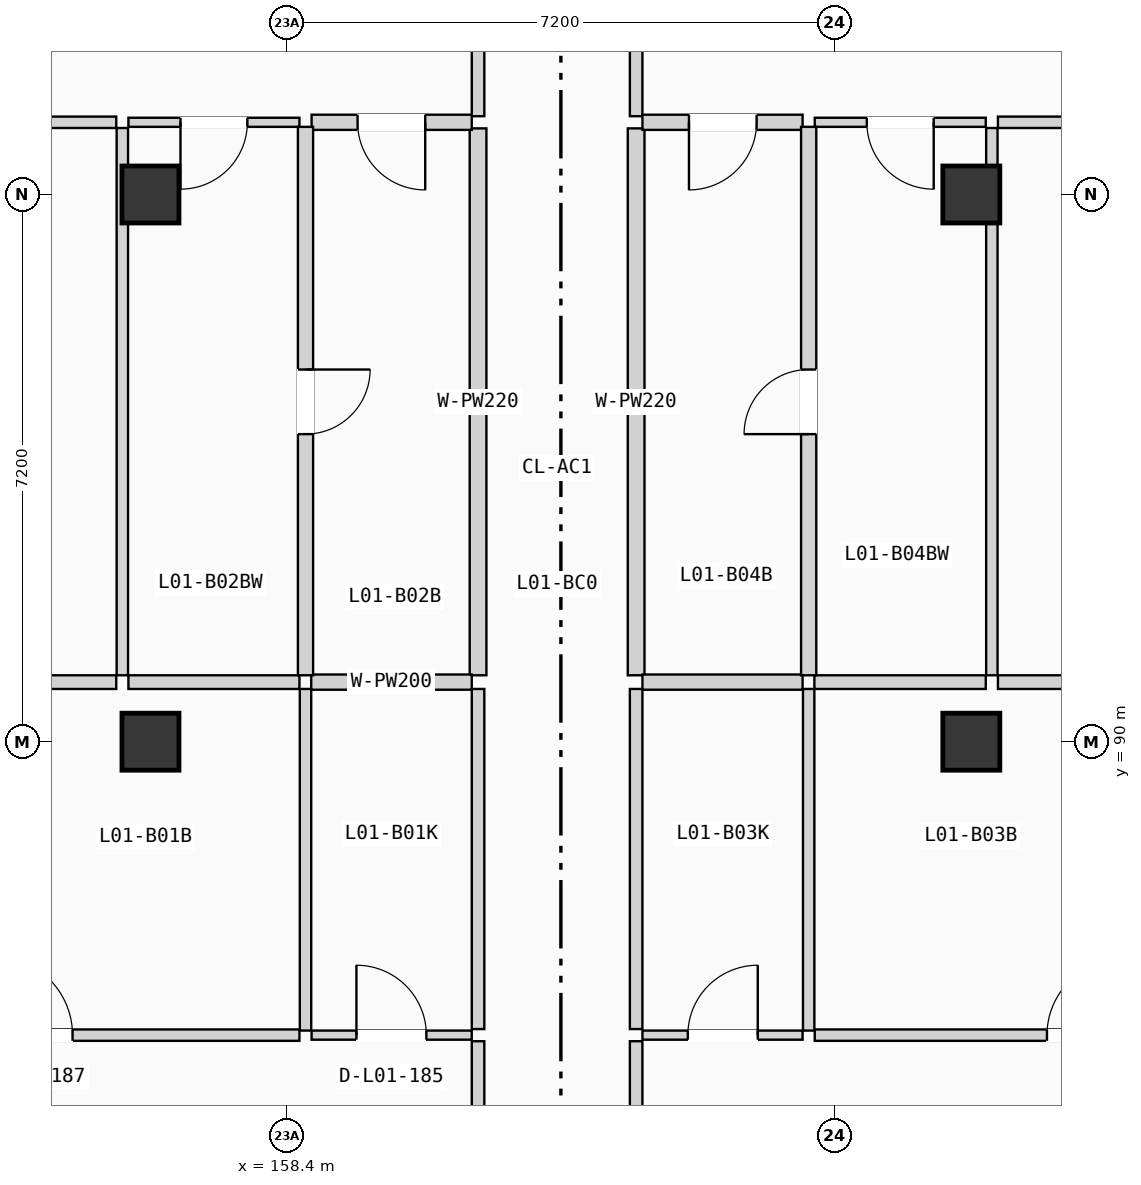
"""IFC4 building model, lengths in metres.
Left out: names, types, materials, properties, quantities, classifications, styles, units other than length and angle.
Written with IfcOpenShell. Run it as: python <this file> out.ifc"""

import sys

from ifc_helpers import new_model, si_unit, direction, frame, frame_2d, origin, origin_2d, place, context, subcontext, project, spatial, rectangle, extrude, element, fill, save


model = new_model("IFC4")
c1 = context("Model", 3, precision=1e-05, world=origin(), true_north=direction((0.0, 1.0)))
c2 = subcontext(c1, "Body", "Model", "MODEL_VIEW")
j1 = project(units=[si_unit("LENGTHUNIT", "METRE"), si_unit("PLANEANGLEUNIT", "RADIAN")], contexts=[c1])
p1 = place(None, origin())
s1 = spatial("IfcSite", under=j1, at=p1, CompositionType="ELEMENT")
p2 = place(p1, origin())
s2 = spatial("IfcBuilding", under=s1, at=p2, CompositionType="ELEMENT")
p3 = place(p2, frame((0.0, 0.0, 4.9)))
s3 = spatial("IfcBuildingStorey", under=s2, at=p3, CompositionType="ELEMENT", Elevation=4.9)
for number, where, z_axis, x_axis in (
    (1, (156.6, 90.0, 0.0), (0.0, 0.0, 1.0), (1.0, 0.0, 0.0)),
    (2, (156.6, 97.2, 0.0), (0.0, 0.0, 1.0), (1.0, 0.0, 0.0)),
    (3, (167.4, 90.0, 0.0), (0.0, 0.0, 1.0), (1.0, 0.0, 0.0)),
    (4, (167.4, 97.2, 0.0), (0.0, 0.0, 1.0), (1.0, 0.0, 0.0)),
):
    element("IfcColumn", number, at=place(p3, frame(where, z_axis=z_axis, x_axis=x_axis)), inside=s3, PredefinedType="COLUMN", context=c2, shape_type="SweptSolid", body=[
        extrude(rectangle(XDim=0.75, YDim=0.75, at=origin_2d()), origin(), (0.0, 0.0, 1.0), 3.675),
    ])
p4 = place(p3, frame((160.91, 80.635, 0.0), z_axis=(0.0, 0.0, 1.0), x_axis=(0.0, 1.0, 0.0)))
e5 = element("IfcWall", 5, at=p4, inside=s3, PredefinedType="PARTITIONING", context=c2, shape_type="SweptSolid", body=[
    extrude(rectangle(XDim=5.424, YDim=0.165, at=frame_2d((2.712, 0.0))), origin(), (0.0, 0.0, 1.0), 3.395),
])
p5 = place(p4, frame((2.207, 0.0, 0.0)))
e6 = element("IfcOpeningElement", 6, at=p5, cuts=e5, PredefinedType="OPENING", context=c2, shape_type="SweptSolid", body=[
    extrude(rectangle(XDim=1.01, YDim=2.11, at=frame_2d((0.505, 1.055))), frame((0.0, 0.093, 0.0), z_axis=(0.0, -1.0, 0.0), x_axis=(1.0, 0.0, 0.0)), (0.0, 0.0, 1.0), 0.185),
])
p6 = place(p3, frame((160.91, 86.219, 0.0), z_axis=(0.0, 0.0, 1.0), x_axis=(0.0, 1.0, 0.0)))
e7 = element("IfcWall", 7, at=p6, inside=s3, PredefinedType="PARTITIONING", context=c2, shape_type="SweptSolid", body=[
    extrude(rectangle(XDim=4.475, YDim=0.165, at=frame_2d((2.238, 0.0))), origin(), (0.0, 0.0, 1.0), 3.395),
])
p7 = place(p3, frame((160.91, 98.23, 0.0), z_axis=(0.0, 0.0, 1.0), x_axis=(0.0, 1.0, 0.0)))
e8 = element("IfcWall", 8, at=p7, inside=s3, PredefinedType="PARTITIONING", context=c2, shape_type="SweptSolid", body=[
    extrude(rectangle(XDim=5.14, YDim=0.165, at=frame_2d((2.57, 0.0))), origin(), (0.0, 0.0, 1.0), 3.395),
])
p8 = place(p7, frame((2.065, 0.0, 0.0)))
e9 = element("IfcOpeningElement", 9, at=p8, cuts=e8, PredefinedType="OPENING", context=c2, shape_type="SweptSolid", body=[
    extrude(rectangle(XDim=1.01, YDim=2.11, at=frame_2d((0.505, 1.055))), frame((0.0, 0.093, 0.0), z_axis=(0.0, -1.0, 0.0), x_axis=(1.0, 0.0, 0.0)), (0.0, 0.0, 1.0), 0.185),
])
p9 = place(p3, frame((160.91, 90.874, 0.0), z_axis=(0.0, 0.0, 1.0), x_axis=(0.0, 1.0, 0.0)))
e10 = element("IfcWall", 10, at=p9, inside=s3, PredefinedType="PLUMBINGWALL", context=c2, shape_type="SweptSolid", body=[
    extrude(rectangle(XDim=7.196, YDim=0.22, at=frame_2d((3.598, 0.0))), origin(), (0.0, 0.0, 1.0), 3.395),
])
p10 = place(p3, frame((162.99, 80.635, 0.0), z_axis=(0.0, 0.0, 1.0), x_axis=(0.0, 1.0, 0.0)))
e11 = element("IfcWall", 11, at=p10, inside=s3, PredefinedType="PARTITIONING", context=c2, shape_type="SweptSolid", body=[
    extrude(rectangle(XDim=5.424, YDim=0.165, at=frame_2d((2.712, 0.0))), origin(), (0.0, 0.0, 1.0), 3.395),
])
p11 = place(p10, frame((2.207, 0.0, 0.0)))
e12 = element("IfcOpeningElement", 12, at=p11, cuts=e11, PredefinedType="OPENING", context=c2, shape_type="SweptSolid", body=[
    extrude(rectangle(XDim=1.01, YDim=2.11, at=frame_2d((0.505, 1.055))), frame((0.0, 0.093, 0.0), z_axis=(0.0, -1.0, 0.0), x_axis=(1.0, 0.0, 0.0)), (0.0, 0.0, 1.0), 0.185),
])
p12 = place(p3, frame((162.99, 86.219, 0.0), z_axis=(0.0, 0.0, 1.0), x_axis=(0.0, 1.0, 0.0)))
e13 = element("IfcWall", 13, at=p12, inside=s3, PredefinedType="PARTITIONING", context=c2, shape_type="SweptSolid", body=[
    extrude(rectangle(XDim=4.475, YDim=0.165, at=frame_2d((2.238, 0.0))), origin(), (0.0, 0.0, 1.0), 3.395),
])
p13 = place(p3, frame((162.99, 98.23, 0.0), z_axis=(0.0, 0.0, 1.0), x_axis=(0.0, 1.0, 0.0)))
e14 = element("IfcWall", 14, at=p13, inside=s3, PredefinedType="PARTITIONING", context=c2, shape_type="SweptSolid", body=[
    extrude(rectangle(XDim=5.14, YDim=0.165, at=frame_2d((2.57, 0.0))), origin(), (0.0, 0.0, 1.0), 3.395),
])
p14 = place(p13, frame((2.065, 0.0, 0.0)))
e15 = element("IfcOpeningElement", 15, at=p14, cuts=e14, PredefinedType="OPENING", context=c2, shape_type="SweptSolid", body=[
    extrude(rectangle(XDim=1.01, YDim=2.11, at=frame_2d((0.505, 1.055))), frame((0.0, 0.093, 0.0), z_axis=(0.0, -1.0, 0.0), x_axis=(1.0, 0.0, 0.0)), (0.0, 0.0, 1.0), 0.185),
])
p15 = place(p3, frame((162.99, 90.874, 0.0), z_axis=(0.0, 0.0, 1.0), x_axis=(0.0, 1.0, 0.0)))
e16 = element("IfcWall", 16, at=p15, inside=s3, PredefinedType="PLUMBINGWALL", context=c2, shape_type="SweptSolid", body=[
    extrude(rectangle(XDim=7.196, YDim=0.22, at=frame_2d((3.598, 0.0))), origin(), (0.0, 0.0, 1.0), 3.395),
])
p16 = place(p3, frame((158.72, 86.139, 0.0), z_axis=(0.0, 0.0, 1.0), x_axis=(1.0, 0.0, 0.0)))
e17 = element("IfcWall", 17, at=p16, inside=s3, PredefinedType="PARTITIONING", context=c2, shape_type="SweptSolid", body=[
    extrude(rectangle(XDim=2.107, YDim=0.12, at=frame_2d((1.053, 0.0))), origin(), (0.0, 0.0, 1.0), 3.395),
])
p17 = place(p16, frame((0.59, 0.0, 0.0)))
e18 = element("IfcOpeningElement", 18, at=p17, cuts=e17, PredefinedType="OPENING", context=c2, shape_type="SweptSolid", body=[
    extrude(rectangle(XDim=0.92, YDim=2.02, at=frame_2d((0.46, 1.01))), frame((0.0, 0.07, 0.0), z_axis=(0.0, -1.0, 0.0), x_axis=(1.0, 0.0, 0.0)), (0.0, 0.0, 1.0), 0.14),
])
p18 = place(p3, frame((151.54, 86.139, 0.0), z_axis=(0.0, 0.0, 1.0), x_axis=(1.0, 0.0, 0.0)))
e19 = element("IfcWall", 19, at=p18, inside=s3, PredefinedType="PARTITIONING", context=c2, shape_type="SweptSolid", body=[
    extrude(rectangle(XDim=7.02, YDim=0.15, at=frame_2d((3.51, 0.0))), origin(), (0.0, 0.0, 1.0), 3.395),
])
p19 = place(p18, frame((2.995, 0.0, 0.0)))
e20 = element("IfcOpeningElement", 20, at=p19, cuts=e19, PredefinedType="OPENING", context=c2, shape_type="SweptSolid", body=[
    extrude(rectangle(XDim=1.04, YDim=2.08, at=frame_2d((0.52, 1.04))), frame((0.0, 0.085, 0.0), z_axis=(0.0, -1.0, 0.0), x_axis=(1.0, 0.0, 0.0)), (0.0, 0.0, 1.0), 0.17),
])
p20 = place(p3, frame((158.64, 86.199, 0.0), z_axis=(0.0, 0.0, 1.0), x_axis=(0.0, 1.0, 0.0)))
e21 = element("IfcWall", 21, at=p20, inside=s3, PredefinedType="PARTITIONING", context=c2, shape_type="SweptSolid", body=[
    extrude(rectangle(XDim=4.495, YDim=0.15, at=frame_2d((2.248, 0.0))), origin(), (0.0, 0.0, 1.0), 3.395),
])
p21 = place(p3, frame((158.715, 90.784, 0.0), z_axis=(0.0, 0.0, 1.0), x_axis=(1.0, 0.0, 0.0)))
e22 = element("IfcWall", 22, at=p21, inside=s3, PredefinedType="PLUMBINGWALL", context=c2, shape_type="SweptSolid", body=[
    extrude(rectangle(XDim=2.112, YDim=0.2, at=frame_2d((1.056, 0.0))), origin(), (0.0, 0.0, 1.0), 3.395),
])
p22 = place(p3, frame((151.54, 90.784, 0.0), z_axis=(0.0, 0.0, 1.0), x_axis=(1.0, 0.0, 0.0)))
e23 = element("IfcWall", 23, at=p22, inside=s3, PredefinedType="PARTITIONING", context=c2, shape_type="SweptSolid", body=[
    extrude(rectangle(XDim=4.61, YDim=0.18, at=frame_2d((2.305, 0.0))), origin(), (0.0, 0.0, 1.0), 3.395),
])
p23 = place(p3, frame((156.31, 90.784, 0.0), z_axis=(0.0, 0.0, 1.0), x_axis=(1.0, 0.0, 0.0)))
e24 = element("IfcWall", 24, at=p23, inside=s3, PredefinedType="PARTITIONING", context=c2, shape_type="SweptSolid", body=[
    extrude(rectangle(XDim=2.25, YDim=0.18, at=frame_2d((1.125, 0.0))), origin(), (0.0, 0.0, 1.0), 3.395),
])
p24 = place(p3, frame((158.72, 98.15, 0.0), z_axis=(0.0, 0.0, 1.0), x_axis=(1.0, 0.0, 0.0)))
e25 = element("IfcWall", 25, at=p24, inside=s3, PredefinedType="PLUMBINGWALL", context=c2, shape_type="SweptSolid", body=[
    extrude(rectangle(XDim=2.107, YDim=0.2, at=frame_2d((1.053, 0.0))), origin(), (0.0, 0.0, 1.0), 3.395),
])
p25 = place(p24, frame((0.605, 0.0, 0.0)))
e26 = element("IfcOpeningElement", 26, at=p25, cuts=e25, PredefinedType="OPENING", context=c2, shape_type="SweptSolid", body=[
    extrude(rectangle(XDim=0.89, YDim=2.03, at=frame_2d((0.445, 1.015))), frame((0.0, 0.11, 0.0), z_axis=(0.0, -1.0, 0.0), x_axis=(1.0, 0.0, 0.0)), (0.0, 0.0, 1.0), 0.22),
])
p26 = place(p3, frame((151.54, 98.15, 0.0), z_axis=(0.0, 0.0, 1.0), x_axis=(1.0, 0.0, 0.0)))
e27 = element("IfcWall", 27, at=p26, inside=s3, PredefinedType="PARTITIONING", context=c2, shape_type="SweptSolid", body=[
    extrude(rectangle(XDim=4.61, YDim=0.15, at=frame_2d((2.305, 0.0))), origin(), (0.0, 0.0, 1.0), 3.395),
])
p27 = place(p26, frame((1.81, 0.0, 0.0)))
e28 = element("IfcOpeningElement", 28, at=p27, cuts=e27, PredefinedType="OPENING", context=c2, shape_type="SweptSolid", body=[
    extrude(rectangle(XDim=1.0, YDim=2.06, at=frame_2d((0.5, 1.03))), frame((0.0, 0.085, 0.0), z_axis=(0.0, -1.0, 0.0), x_axis=(1.0, 0.0, 0.0)), (0.0, 0.0, 1.0), 0.17),
])
p28 = place(p3, frame((156.31, 98.15, 0.0), z_axis=(0.0, 0.0, 1.0), x_axis=(1.0, 0.0, 0.0)))
e29 = element("IfcWall", 29, at=p28, inside=s3, PredefinedType="PARTITIONING", context=c2, shape_type="SweptSolid", body=[
    extrude(rectangle(XDim=2.25, YDim=0.12, at=frame_2d((1.125, 0.0))), origin(), (0.0, 0.0, 1.0), 3.395),
])
p29 = place(p28, frame((0.685, 0.0, 0.0)))
e30 = element("IfcOpeningElement", 30, at=p29, cuts=e29, PredefinedType="OPENING", context=c2, shape_type="SweptSolid", body=[
    extrude(rectangle(XDim=0.88, YDim=2.02, at=frame_2d((0.44, 1.01))), frame((0.0, 0.07, 0.0), z_axis=(0.0, -1.0, 0.0), x_axis=(1.0, 0.0, 0.0)), (0.0, 0.0, 1.0), 0.14),
])
p30 = place(p3, frame((158.64, 90.874, 0.0), z_axis=(0.0, 0.0, 1.0), x_axis=(0.0, 1.0, 0.0)))
e31 = element("IfcWall", 31, at=p30, inside=s3, PredefinedType="PLUMBINGWALL", context=c2, shape_type="SweptSolid", body=[
    extrude(rectangle(XDim=7.216, YDim=0.2, at=frame_2d((3.608, 0.0))), origin(), (0.0, 0.0, 1.0), 3.395),
])
p31 = place(p30, frame((3.173, 0.0, 0.0)))
e32 = element("IfcOpeningElement", 32, at=p31, cuts=e31, PredefinedType="OPENING", context=c2, shape_type="SweptSolid", body=[
    extrude(rectangle(XDim=0.85, YDim=2.01, at=frame_2d((0.425, 1.005))), frame((0.0, 0.11, 0.0), z_axis=(0.0, -1.0, 0.0), x_axis=(1.0, 0.0, 0.0)), (0.0, 0.0, 1.0), 0.22),
])
p32 = place(p3, frame((156.23, 90.874, 0.0), z_axis=(0.0, 0.0, 1.0), x_axis=(0.0, 1.0, 0.0)))
e33 = element("IfcWall", 33, at=p32, inside=s3, PredefinedType="PARTITIONING", context=c2, shape_type="SweptSolid", body=[
    extrude(rectangle(XDim=7.201, YDim=0.15, at=frame_2d((3.601, 0.0))), origin(), (0.0, 0.0, 1.0), 3.395),
])
p33 = place(p3, frame((163.073, 86.139, 0.0), z_axis=(0.0, 0.0, 1.0), x_axis=(1.0, 0.0, 0.0)))
e34 = element("IfcWall", 34, at=p33, inside=s3, PredefinedType="PARTITIONING", context=c2, shape_type="SweptSolid", body=[
    extrude(rectangle(XDim=2.107, YDim=0.12, at=frame_2d((1.053, 0.0))), origin(), (0.0, 0.0, 1.0), 3.395),
])
p34 = place(p33, frame((0.597, 0.0, 0.0)))
e35 = element("IfcOpeningElement", 35, at=p34, cuts=e34, PredefinedType="OPENING", context=c2, shape_type="SweptSolid", body=[
    extrude(rectangle(XDim=0.92, YDim=2.02, at=frame_2d((0.46, 1.01))), frame((0.0, 0.07, 0.0), z_axis=(0.0, -1.0, 0.0), x_axis=(1.0, 0.0, 0.0)), (0.0, 0.0, 1.0), 0.14),
])
p35 = place(p3, frame((165.34, 86.139, 0.0), z_axis=(0.0, 0.0, 1.0), x_axis=(1.0, 0.0, 0.0)))
e36 = element("IfcWall", 36, at=p35, inside=s3, PredefinedType="PARTITIONING", context=c2, shape_type="SweptSolid", body=[
    extrude(rectangle(XDim=7.12, YDim=0.15, at=frame_2d((3.56, 0.0))), origin(), (0.0, 0.0, 1.0), 3.395),
])
p36 = place(p35, frame((3.055, 0.0, 0.0)))
e37 = element("IfcOpeningElement", 37, at=p36, cuts=e36, PredefinedType="OPENING", context=c2, shape_type="SweptSolid", body=[
    extrude(rectangle(XDim=1.0, YDim=2.06, at=frame_2d((0.5, 1.03))), frame((0.0, 0.085, 0.0), z_axis=(0.0, -1.0, 0.0), x_axis=(1.0, 0.0, 0.0)), (0.0, 0.0, 1.0), 0.17),
])
p37 = place(p3, frame((165.26, 86.199, 0.0), z_axis=(0.0, 0.0, 1.0), x_axis=(0.0, 1.0, 0.0)))
e38 = element("IfcWall", 38, at=p37, inside=s3, PredefinedType="PARTITIONING", context=c2, shape_type="SweptSolid", body=[
    extrude(rectangle(XDim=4.495, YDim=0.15, at=frame_2d((2.248, 0.0))), origin(), (0.0, 0.0, 1.0), 3.395),
])
p38 = place(p3, frame((163.073, 90.784, 0.0), z_axis=(0.0, 0.0, 1.0), x_axis=(1.0, 0.0, 0.0)))
e39 = element("IfcWall", 39, at=p38, inside=s3, PredefinedType="PLUMBINGWALL", context=c2, shape_type="SweptSolid", body=[
    extrude(rectangle(XDim=2.107, YDim=0.2, at=frame_2d((1.053, 0.0))), origin(), (0.0, 0.0, 1.0), 3.395),
])
p39 = place(p3, frame((167.75, 90.784, 0.0), z_axis=(0.0, 0.0, 1.0), x_axis=(1.0, 0.0, 0.0)))
e40 = element("IfcWall", 40, at=p39, inside=s3, PredefinedType="PARTITIONING", context=c2, shape_type="SweptSolid", body=[
    extrude(rectangle(XDim=4.71, YDim=0.18, at=frame_2d((2.355, 0.0))), origin(), (0.0, 0.0, 1.0), 3.395),
])
p40 = place(p3, frame((165.335, 90.784, 0.0), z_axis=(0.0, 0.0, 1.0), x_axis=(1.0, 0.0, 0.0)))
e41 = element("IfcWall", 41, at=p40, inside=s3, PredefinedType="PARTITIONING", context=c2, shape_type="SweptSolid", body=[
    extrude(rectangle(XDim=2.255, YDim=0.18, at=frame_2d((1.127, 0.0))), origin(), (0.0, 0.0, 1.0), 3.395),
])
p41 = place(p3, frame((163.073, 98.15, 0.0), z_axis=(0.0, 0.0, 1.0), x_axis=(1.0, 0.0, 0.0)))
e42 = element("IfcWall", 42, at=p41, inside=s3, PredefinedType="PLUMBINGWALL", context=c2, shape_type="SweptSolid", body=[
    extrude(rectangle(XDim=2.107, YDim=0.2, at=frame_2d((1.053, 0.0))), origin(), (0.0, 0.0, 1.0), 3.395),
])
p42 = place(p41, frame((0.612, 0.0, 0.0)))
e43 = element("IfcOpeningElement", 43, at=p42, cuts=e42, PredefinedType="OPENING", context=c2, shape_type="SweptSolid", body=[
    extrude(rectangle(XDim=0.89, YDim=2.03, at=frame_2d((0.445, 1.015))), frame((0.0, 0.11, 0.0), z_axis=(0.0, -1.0, 0.0), x_axis=(1.0, 0.0, 0.0)), (0.0, 0.0, 1.0), 0.22),
])
p43 = place(p3, frame((167.75, 98.15, 0.0), z_axis=(0.0, 0.0, 1.0), x_axis=(1.0, 0.0, 0.0)))
e44 = element("IfcWall", 44, at=p43, inside=s3, PredefinedType="PARTITIONING", context=c2, shape_type="SweptSolid", body=[
    extrude(rectangle(XDim=4.71, YDim=0.15, at=frame_2d((2.355, 0.0))), origin(), (0.0, 0.0, 1.0), 3.395),
])
p44 = place(p43, frame((1.88, 0.0, 0.0)))
e45 = element("IfcOpeningElement", 45, at=p44, cuts=e44, PredefinedType="OPENING", context=c2, shape_type="SweptSolid", body=[
    extrude(rectangle(XDim=0.94, YDim=2.06, at=frame_2d((0.47, 1.03))), frame((0.0, 0.085, 0.0), z_axis=(0.0, -1.0, 0.0), x_axis=(1.0, 0.0, 0.0)), (0.0, 0.0, 1.0), 0.17),
])
p45 = place(p3, frame((165.34, 98.15, 0.0), z_axis=(0.0, 0.0, 1.0), x_axis=(1.0, 0.0, 0.0)))
e46 = element("IfcWall", 46, at=p45, inside=s3, PredefinedType="PARTITIONING", context=c2, shape_type="SweptSolid", body=[
    extrude(rectangle(XDim=2.25, YDim=0.12, at=frame_2d((1.125, 0.0))), origin(), (0.0, 0.0, 1.0), 3.395),
])
p46 = place(p45, frame((0.685, 0.0, 0.0)))
e47 = element("IfcOpeningElement", 47, at=p46, cuts=e46, PredefinedType="OPENING", context=c2, shape_type="SweptSolid", body=[
    extrude(rectangle(XDim=0.88, YDim=2.02, at=frame_2d((0.44, 1.01))), frame((0.0, 0.07, 0.0), z_axis=(0.0, -1.0, 0.0), x_axis=(1.0, 0.0, 0.0)), (0.0, 0.0, 1.0), 0.14),
])
p47 = place(p3, frame((165.26, 90.874, 0.0), z_axis=(0.0, 0.0, 1.0), x_axis=(0.0, 1.0, 0.0)))
e48 = element("IfcWall", 48, at=p47, inside=s3, PredefinedType="PLUMBINGWALL", context=c2, shape_type="SweptSolid", body=[
    extrude(rectangle(XDim=7.216, YDim=0.2, at=frame_2d((3.608, 0.0))), origin(), (0.0, 0.0, 1.0), 3.395),
])
p48 = place(p47, frame((3.173, 0.0, 0.0)))
e49 = element("IfcOpeningElement", 49, at=p48, cuts=e48, PredefinedType="OPENING", context=c2, shape_type="SweptSolid", body=[
    extrude(rectangle(XDim=0.85, YDim=2.01, at=frame_2d((0.425, 1.005))), frame((0.0, 0.11, 0.0), z_axis=(0.0, -1.0, 0.0), x_axis=(1.0, 0.0, 0.0)), (0.0, 0.0, 1.0), 0.22),
])
p49 = place(p3, frame((167.67, 90.874, 0.0), z_axis=(0.0, 0.0, 1.0), x_axis=(0.0, 1.0, 0.0)))
e50 = element("IfcWall", 50, at=p49, inside=s3, PredefinedType="PARTITIONING", context=c2, shape_type="SweptSolid", body=[
    extrude(rectangle(XDim=7.201, YDim=0.15, at=frame_2d((3.601, 0.0))), origin(), (0.0, 0.0, 1.0), 3.395),
])
p50 = place(p17, origin())
e51 = element("IfcDoor", 51, at=p50, inside=s3, OperationType="SINGLE_SWING_LEFT", PredefinedType="DOOR", context=c2, shape_type="SweptSolid", body=[
    extrude(rectangle(XDim=0.92, YDim=2.02, at=frame_2d((0.46, 1.01))), frame((0.0, 0.025, 0.0), z_axis=(0.0, -1.0, 0.0), x_axis=(1.0, 0.0, 0.0)), (0.0, 0.0, 1.0), 0.05),
])
fill(e18, e51)
p51 = place(p19, origin())
e52 = element("IfcDoor", 52, at=p51, inside=s3, OperationType="SINGLE_SWING_LEFT", PredefinedType="DOOR", context=c2, shape_type="SweptSolid", body=[
    extrude(rectangle(XDim=1.04, YDim=2.08, at=frame_2d((0.52, 1.04))), frame((0.0, 0.025, 0.0), z_axis=(0.0, -1.0, 0.0), x_axis=(1.0, 0.0, 0.0)), (0.0, 0.0, 1.0), 0.05),
])
fill(e20, e52)
p52 = place(p25, frame((0.89, 0.0, 0.0), z_axis=(0.0, 0.0, 1.0), x_axis=(-1.0, 0.0, 0.0)))
e53 = element("IfcDoor", 53, at=p52, inside=s3, OperationType="SINGLE_SWING_RIGHT", PredefinedType="DOOR", context=c2, shape_type="SweptSolid", body=[
    extrude(rectangle(XDim=0.89, YDim=2.03, at=frame_2d((0.445, 1.015))), frame((0.0, 0.025, 0.0), z_axis=(0.0, -1.0, 0.0), x_axis=(1.0, 0.0, 0.0)), (0.0, 0.0, 1.0), 0.05),
])
fill(e26, e53)
p53 = place(p29, frame((0.88, 0.0, 0.0), z_axis=(0.0, 0.0, 1.0), x_axis=(-1.0, 0.0, 0.0)))
e54 = element("IfcDoor", 54, at=p53, inside=s3, OperationType="SINGLE_SWING_LEFT", PredefinedType="DOOR", context=c2, shape_type="SweptSolid", body=[
    extrude(rectangle(XDim=0.88, YDim=2.02, at=frame_2d((0.44, 1.01))), frame((0.0, 0.025, 0.0), z_axis=(0.0, -1.0, 0.0), x_axis=(1.0, 0.0, 0.0)), (0.0, 0.0, 1.0), 0.05),
])
fill(e30, e54)
p54 = place(p31, frame((0.85, 0.0, 0.0), z_axis=(0.0, 0.0, 1.0), x_axis=(-1.0, 0.0, 0.0)))
e55 = element("IfcDoor", 55, at=p54, inside=s3, OperationType="SINGLE_SWING_RIGHT", PredefinedType="DOOR", context=c2, shape_type="SweptSolid", body=[
    extrude(rectangle(XDim=0.85, YDim=2.01, at=frame_2d((0.425, 1.005))), frame((0.0, 0.025, 0.0), z_axis=(0.0, -1.0, 0.0), x_axis=(1.0, 0.0, 0.0)), (0.0, 0.0, 1.0), 0.05),
])
fill(e32, e55)
p55 = place(p34, origin())
e56 = element("IfcDoor", 56, at=p55, inside=s3, OperationType="SINGLE_SWING_RIGHT", PredefinedType="DOOR", context=c2, shape_type="SweptSolid", body=[
    extrude(rectangle(XDim=0.92, YDim=2.02, at=frame_2d((0.46, 1.01))), frame((0.0, 0.025, 0.0), z_axis=(0.0, -1.0, 0.0), x_axis=(1.0, 0.0, 0.0)), (0.0, 0.0, 1.0), 0.05),
])
fill(e35, e56)
p56 = place(p36, origin())
e57 = element("IfcDoor", 57, at=p56, inside=s3, OperationType="SINGLE_SWING_RIGHT", PredefinedType="DOOR", context=c2, shape_type="SweptSolid", body=[
    extrude(rectangle(XDim=1.0, YDim=2.06, at=frame_2d((0.5, 1.03))), frame((0.0, 0.025, 0.0), z_axis=(0.0, -1.0, 0.0), x_axis=(1.0, 0.0, 0.0)), (0.0, 0.0, 1.0), 0.05),
])
fill(e37, e57)
p57 = place(p42, frame((0.89, 0.0, 0.0), z_axis=(0.0, 0.0, 1.0), x_axis=(-1.0, 0.0, 0.0)))
e58 = element("IfcDoor", 58, at=p57, inside=s3, OperationType="SINGLE_SWING_LEFT", PredefinedType="DOOR", context=c2, shape_type="SweptSolid", body=[
    extrude(rectangle(XDim=0.89, YDim=2.03, at=frame_2d((0.445, 1.015))), frame((0.0, 0.025, 0.0), z_axis=(0.0, -1.0, 0.0), x_axis=(1.0, 0.0, 0.0)), (0.0, 0.0, 1.0), 0.05),
])
fill(e43, e58)
p58 = place(p46, frame((0.88, 0.0, 0.0), z_axis=(0.0, 0.0, 1.0), x_axis=(-1.0, 0.0, 0.0)))
e59 = element("IfcDoor", 59, at=p58, inside=s3, OperationType="SINGLE_SWING_RIGHT", PredefinedType="DOOR", context=c2, shape_type="SweptSolid", body=[
    extrude(rectangle(XDim=0.88, YDim=2.02, at=frame_2d((0.44, 1.01))), frame((0.0, 0.025, 0.0), z_axis=(0.0, -1.0, 0.0), x_axis=(1.0, 0.0, 0.0)), (0.0, 0.0, 1.0), 0.05),
])
fill(e47, e59)
p59 = place(p48, origin())
e60 = element("IfcDoor", 60, at=p59, inside=s3, OperationType="SINGLE_SWING_LEFT", PredefinedType="DOOR", context=c2, shape_type="SweptSolid", body=[
    extrude(rectangle(XDim=0.85, YDim=2.01, at=frame_2d((0.425, 1.005))), frame((0.0, 0.025, 0.0), z_axis=(0.0, -1.0, 0.0), x_axis=(1.0, 0.0, 0.0)), (0.0, 0.0, 1.0), 0.05),
])
fill(e49, e60)
save(model, sys.argv[1])
